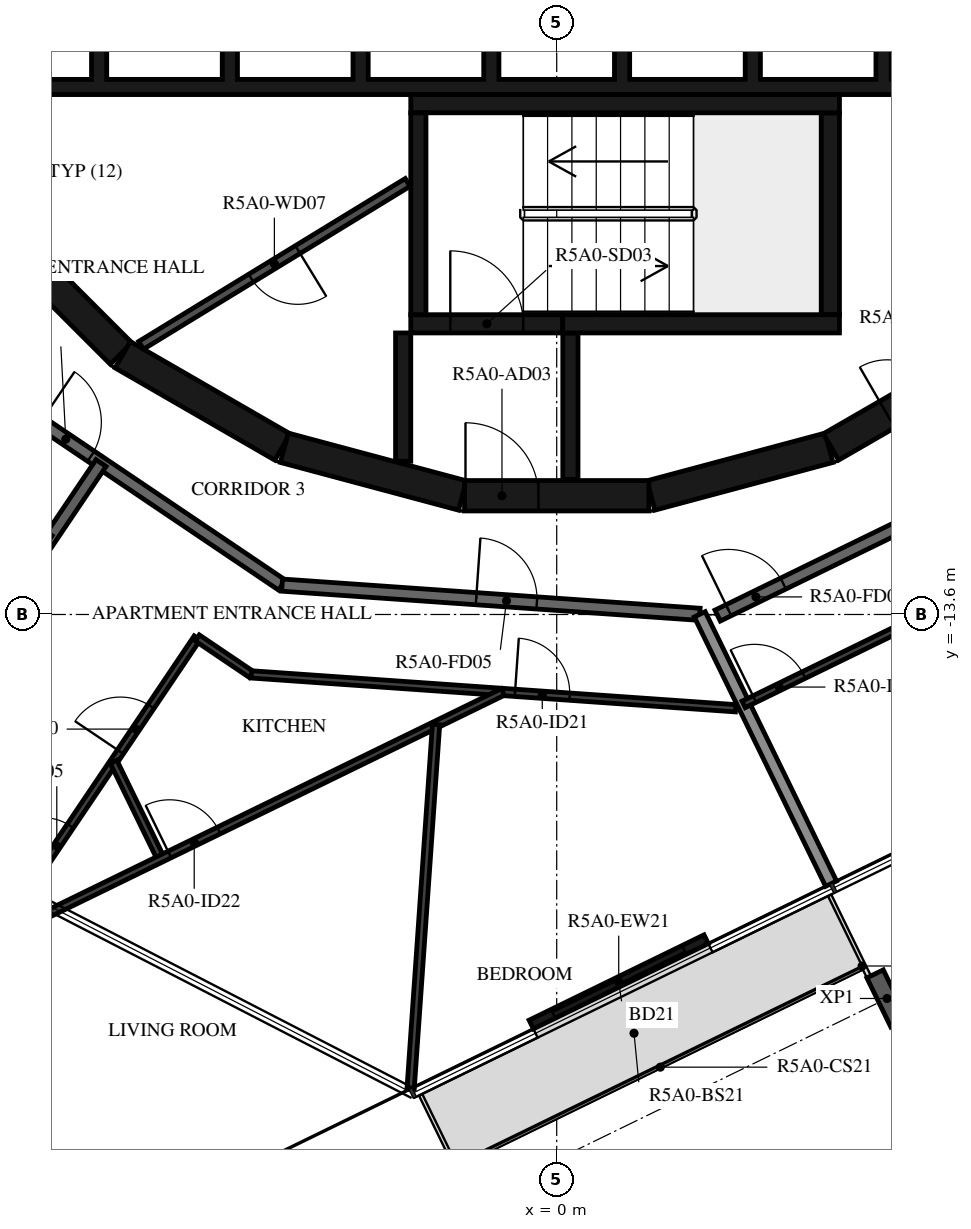
"""IFC4 building model, lengths in metres.
Left out: names, types, materials, properties, quantities, classifications, styles, units other than length and angle.
Written with IfcOpenShell. Run it as: python <this file> out.ifc"""

import sys

from ifc_helpers import new_model, si_unit, direction, frame, frame_2d, origin, origin_2d, place, context, subcontext, project, spatial, polyline, rectangle, i_section, outline, extrude, element, fill, save


model = new_model("IFC4")
c1 = context("Model", 3, precision=1e-05, world=origin(), true_north=direction((0.0, 1.0)))
c2 = subcontext(c1, "Body", "Model", "MODEL_VIEW")
j1 = project(units=[si_unit("LENGTHUNIT", "METRE"), si_unit("PLANEANGLEUNIT", "RADIAN")], contexts=[c1])
p1 = place(None, origin())
s1 = spatial("IfcSite", under=j1, at=p1, CompositionType="ELEMENT")
p2 = place(p1, origin())
s2 = spatial("IfcBuilding", under=s1, at=p2, CompositionType="ELEMENT")
p3 = place(p2, frame((0.0, 0.0, 195.4)))
s3 = spatial("IfcBuildingStorey", under=s2, at=p3, CompositionType="ELEMENT", Elevation=195.4)
p4 = place(p3, frame((5.433, -19.915, -0.38), z_axis=(0.0, 0.0, 1.0), x_axis=(-0.898794095235, -0.438371046456, 0.0)))
e1 = element("IfcColumn", 1, at=p4, inside=s3, PredefinedType="COLUMN", context=c2, shape_type="SweptSolid", body=[
    extrude(i_section(OverallWidth=0.3, OverallDepth=0.9, WebThickness=0.019, FlangeThickness=0.035, FilletRadius=0.03, at=origin_2d()), origin(), (0.0, 0.0, 1.0), 3.5),
])
p5 = place(p3, frame((-0.418, -20.343, 0.0), z_axis=(0.0, 0.0, 1.0), x_axis=(0.898778711213, 0.43840258698, 0.0)))
e2 = element("IfcWall", 2, at=p5, inside=s3, PredefinedType="STANDARD", context=c2, shape_type="SweptSolid", body=[
    extrude(rectangle(XDim=3.2, YDim=0.16, at=frame_2d((1.6, 0.0))), origin(), (0.0, 0.0, 1.0), 3.12),
])
p6 = place(p5, frame((0.4, 0.0, 0.0)))
e3 = element("IfcOpeningElement", 3, at=p6, cuts=e2, PredefinedType="OPENING", context=c2, shape_type="SweptSolid", body=[
    extrude(rectangle(XDim=2.4, YDim=2.4, at=frame_2d((1.2, 1.2))), frame((0.0, 0.09, 0.0), z_axis=(0.0, -1.0, 0.0), x_axis=(1.0, 0.0, 0.0)), (0.0, 0.0, 1.0), 0.18),
])
p7 = place(p3, frame((1.55, -11.643, 0.0), z_axis=(0.0, 0.0, 1.0), x_axis=(0.965948410781, 0.258734743916, 0.0)))
e4 = element("IfcWall", 4, at=p7, inside=s3, PredefinedType="SHEAR", context=c2, shape_type="SweptSolid", body=[
    extrude(rectangle(XDim=3.033, YDim=0.5, at=frame_2d((1.516, 0.0))), origin(), (0.0, 0.0, 1.0), 3.12),
])
p8 = place(p3, frame((4.51, -10.845, 0.0), z_axis=(0.0, 0.0, 1.0), x_axis=(0.865975092491, 0.500087131594, 0.0)))
e5 = element("IfcWall", 5, at=p8, inside=s3, PredefinedType="SHEAR", context=c2, shape_type="SweptSolid", body=[
    extrude(rectangle(XDim=3.033, YDim=0.5, at=frame_2d((1.516, 0.0))), origin(), (0.0, 0.0, 1.0), 3.12),
])
p9 = place(p8, frame((1.066, 0.0, 0.0)))
e6 = element("IfcOpeningElement", 6, at=p9, cuts=e5, PredefinedType="OPENING", context=c2, shape_type="SweptSolid", body=[
    extrude(rectangle(XDim=0.9, YDim=2.1, at=frame_2d((0.45, 1.05))), frame((0.0, 0.26, 0.0), z_axis=(0.0, -1.0, 0.0), x_axis=(1.0, 0.0, 0.0)), (0.0, 0.0, 1.0), 0.52),
])
p10 = place(p3, frame((-9.308, -7.164, 0.0), z_axis=(0.0, 0.0, 1.0), x_axis=(0.707106781187, -0.707106781187, 0.0)))
e7 = element("IfcWall", 7, at=p10, inside=s3, PredefinedType="SHEAR", context=c2, shape_type="SweptSolid", body=[
    extrude(rectangle(XDim=3.032, YDim=0.5, at=frame_2d((1.516, 0.0))), origin(), (0.0, 0.0, 1.0), 3.12),
])
for number, where, z_axis, x_axis in (
    (8, (-7.137, -9.329, 0.0), (0.0, 0.0, 1.0), (0.866, -0.5, 0.0)),
    (9, (-4.479, -10.858, 0.0), (0.0, 0.0, 1.0), (0.966, -0.259, 0.0)),
):
    element("IfcWall", number, at=place(p3, frame(where, z_axis=z_axis, x_axis=x_axis)), inside=s3, PredefinedType="SHEAR", context=c2, shape_type="SweptSolid", body=[
        extrude(rectangle(XDim=3.033, YDim=0.5, at=frame_2d((1.516, 0.0))), origin(), (0.0, 0.0, 1.0), 3.12),
    ])
p11 = place(p3, frame((-1.516, -11.647, 0.0), z_axis=(0.0, 0.0, 1.0), x_axis=(1.0, 0.0, 0.0)))
e10 = element("IfcWall", 10, at=p11, inside=s3, PredefinedType="SHEAR", context=c2, shape_type="SweptSolid", body=[
    extrude(rectangle(XDim=3.033, YDim=0.5, at=frame_2d((1.516, 0.0))), origin(), (0.0, 0.0, 1.0), 3.12),
])
p12 = place(p11, frame((0.016, 0.0, 0.0)))
e11 = element("IfcOpeningElement", 11, at=p12, cuts=e10, PredefinedType="OPENING", context=c2, shape_type="SweptSolid", body=[
    extrude(rectangle(XDim=1.2, YDim=2.1, at=frame_2d((0.6, 1.05))), frame((0.0, 0.26, 0.0), z_axis=(0.0, -1.0, 0.0), x_axis=(1.0, 0.0, 0.0)), (0.0, 0.0, 1.0), 0.52),
])
p13 = place(p3, frame((-2.275, -8.67, 0.0), z_axis=(0.0, 0.0, 1.0), x_axis=(0.0, 1.0, 0.0)))
e12 = element("IfcWall", 12, at=p13, inside=s3, PredefinedType="SHEAR", context=c2, shape_type="SweptSolid", body=[
    extrude(rectangle(XDim=3.32, YDim=0.25, at=frame_2d((1.66, 0.0))), origin(), (0.0, 0.0, 1.0), 3.12),
])
p14 = place(p3, frame((-2.4, -5.2, 0.0), z_axis=(0.0, 0.0, 1.0), x_axis=(1.0, 0.0, 0.0)))
e13 = element("IfcWall", 13, at=p14, inside=s3, PredefinedType="SHEAR", context=c2, shape_type="SweptSolid", body=[
    extrude(rectangle(XDim=7.05, YDim=0.3, at=frame_2d((3.525, 0.0))), origin(), (0.0, 0.0, 1.0), 3.12),
])
p15 = place(p3, frame((4.5, -8.67, 0.0), z_axis=(0.0, 0.0, 1.0), x_axis=(0.0, 1.0, 0.0)))
e14 = element("IfcWall", 14, at=p15, inside=s3, PredefinedType="SHEAR", context=c2, shape_type="SweptSolid", body=[
    extrude(rectangle(XDim=3.32, YDim=0.3, at=frame_2d((1.66, 0.0))), origin(), (0.0, 0.0, 1.0), 3.12),
])
p16 = place(p3, frame((0.1, -8.82, 0.0), z_axis=(0.0, 0.0, 1.0), x_axis=(1.0, 0.0, 0.0)))
e15 = element("IfcWall", 15, at=p16, inside=s3, PredefinedType="SHEAR", context=c2, shape_type="SweptSolid", body=[
    extrude(rectangle(XDim=4.55, YDim=0.3, at=frame_2d((2.275, 0.0))), origin(), (0.0, 0.0, 1.0), 3.12),
])
p17 = place(p3, frame((-2.4, -8.82, 0.0), z_axis=(0.0, 0.0, 1.0), x_axis=(1.0, 0.0, 0.0)))
e16 = element("IfcWall", 16, at=p17, inside=s3, PredefinedType="SHEAR", context=c2, shape_type="SweptSolid", body=[
    extrude(rectangle(XDim=2.5, YDim=0.3, at=frame_2d((1.25, 0.0))), origin(), (0.0, 0.0, 1.0), 3.12),
])
p18 = place(p17, frame((0.65, 0.0, 0.0)))
e17 = element("IfcOpeningElement", 17, at=p18, cuts=e16, PredefinedType="OPENING", context=c2, shape_type="SweptSolid", body=[
    extrude(rectangle(XDim=1.2, YDim=2.1, at=frame_2d((0.6, 1.05))), frame((0.0, 0.16, 0.0), z_axis=(0.0, -1.0, 0.0), x_axis=(1.0, 0.0, 0.0)), (0.0, 0.0, 1.0), 0.32),
])
p19 = place(p3, frame((-2.525, -8.97, 0.0), z_axis=(0.0, 0.0, 1.0), x_axis=(0.0, -1.0, 0.0)))
e18 = element("IfcWall", 18, at=p19, inside=s3, PredefinedType="SHEAR", context=c2, shape_type="SweptSolid", body=[
    extrude(rectangle(XDim=2.11, YDim=0.25, at=frame_2d((1.055, 0.0))), origin(), (0.0, 0.0, 1.0), 3.12),
])
p20 = place(p3, frame((0.225, -8.97, 0.0), z_axis=(0.0, 0.0, 1.0), x_axis=(0.0, -1.0, 0.0)))
e19 = element("IfcWall", 19, at=p20, inside=s3, PredefinedType="SHEAR", context=c2, shape_type="SweptSolid", body=[
    extrude(rectangle(XDim=2.41, YDim=0.25, at=frame_2d((1.205, 0.0))), origin(), (0.0, 0.0, 1.0), 3.12),
])
p21 = place(p3, origin())
e20 = element("IfcWall", 20, at=p21, inside=s3, PredefinedType="SHEAR", context=c2, shape_type="SweptSolid", body=[
    extrude(outline(polyline([(9.8, -5.05), (9.8, -4.8), (9.8, -1.9), (9.55, -1.9), (9.55, -4.8), (7.65, -4.8), (7.65, -1.9), (7.4, -1.9), (7.4, -4.8), (5.5, -4.8), (5.5, -1.9), (5.25, -1.9), (5.25, -4.8), (3.35, -4.8), (3.35, -1.9), (3.1, -1.9), (3.1, -4.8), (1.2, -4.8), (1.2, -1.9), (0.95, -1.9), (0.95, -4.8), (-0.95, -4.8), (-0.95, -1.9), (-1.2, -1.9), (-1.2, -4.8), (-3.1, -4.8), (-3.1, -1.9), (-3.35, -1.9), (-3.35, -4.8), (-5.25, -4.8), (-5.25, -1.9), (-5.5, -1.9), (-5.5, -4.8), (-7.4, -4.8), (-7.4, -1.9), (-7.65, -1.9), (-7.65, -4.8), (-9.55, -4.8), (-9.55, -1.9), (-9.8, -1.9), (-9.8, -4.8), (-9.8, -5.05), (9.8, -5.05)])), origin(), (0.0, 0.0, 1.0), 3.12),
])
p22 = place(p3, frame((-2.451, -6.495, 0.0), z_axis=(0.0, 0.0, 1.0), x_axis=(-0.853250115418, -0.521501908471, 0.0)))
e21 = element("IfcWall", 21, at=p22, inside=s3, PredefinedType="PARTITIONING", context=c2, shape_type="SweptSolid", body=[
    extrude(rectangle(XDim=5.137, YDim=0.15, at=frame_2d((2.569, 0.0))), origin(), (0.0, 0.0, 1.0), 3.12),
])
p23 = place(p22, frame((2.119, 0.0, 0.0)))
e22 = element("IfcOpeningElement", 22, at=p23, cuts=e21, PredefinedType="OPENING", context=c2, shape_type="SweptSolid", body=[
    extrude(rectangle(XDim=0.9, YDim=2.1, at=frame_2d((0.45, 1.05))), frame((0.0, 0.085, 0.0), z_axis=(0.0, -1.0, 0.0), x_axis=(1.0, 0.0, 0.0)), (0.0, 0.0, 1.0), 0.17),
])
p24 = place(p3, frame((-10.47, -9.101, 0.0), z_axis=(0.0, 0.0, 1.0), x_axis=(0.829035841718, -0.559195469534, 0.0)))
e23 = element("IfcWall", 23, at=p24, inside=s3, PredefinedType="STANDARD", context=c2, shape_type="SweptSolid", body=[
    extrude(rectangle(XDim=7.181, YDim=0.2, at=frame_2d((3.591, 0.0))), origin(), (0.0, 0.0, 1.0), 3.12),
])
p25 = place(p24, frame((2.39, 0.0, 0.0)))
e24 = element("IfcOpeningElement", 24, at=p25, cuts=e23, PredefinedType="OPENING", context=c2, shape_type="SweptSolid", body=[
    extrude(rectangle(XDim=1.0, YDim=2.1, at=frame_2d((0.5, 1.05))), frame((0.0, 0.11, 0.0), z_axis=(0.0, -1.0, 0.0), x_axis=(1.0, 0.0, 0.0)), (0.0, 0.0, 1.0), 0.22),
])
p26 = place(p3, frame((-4.517, -13.117, 0.0), z_axis=(0.0, 0.0, 1.0), x_axis=(0.997564669554, -0.069747616856, 0.0)))
e25 = element("IfcWall", 25, at=p26, inside=s3, PredefinedType="STANDARD", context=c2, shape_type="SweptSolid", body=[
    extrude(rectangle(XDim=6.885, YDim=0.2, at=frame_2d((3.443, 0.0))), origin(), (0.0, 0.0, 1.0), 3.12),
])
p27 = place(p26, frame((3.2, 0.0, 0.0)))
e26 = element("IfcOpeningElement", 26, at=p27, cuts=e25, PredefinedType="OPENING", context=c2, shape_type="SweptSolid", body=[
    extrude(rectangle(XDim=1.0, YDim=2.1, at=frame_2d((0.5, 1.05))), frame((0.0, 0.11, 0.0), z_axis=(0.0, -1.0, 0.0), x_axis=(1.0, 0.0, 0.0)), (0.0, 0.0, 1.0), 0.22),
])
p28 = place(p3, frame((2.647, -13.618, 0.0), z_axis=(0.0, 0.0, 1.0), x_axis=(0.898796543751, 0.438366026218, 0.0)))
e27 = element("IfcWall", 27, at=p28, inside=s3, PredefinedType="STANDARD", context=c2, shape_type="SweptSolid", body=[
    extrude(rectangle(XDim=7.181, YDim=0.2, at=frame_2d((3.591, 0.0))), origin(), (0.0, 0.0, 1.0), 3.12),
])
p29 = place(p28, frame((0.2, 0.0, 0.0)))
e28 = element("IfcOpeningElement", 28, at=p29, cuts=e27, PredefinedType="OPENING", context=c2, shape_type="SweptSolid", body=[
    extrude(rectangle(XDim=1.0, YDim=2.1, at=frame_2d((0.5, 1.05))), frame((0.0, 0.11, 0.0), z_axis=(0.0, -1.0, 0.0), x_axis=(1.0, 0.0, 0.0)), (0.0, 0.0, 1.0), 0.22),
])
p30 = place(p3, frame((-10.407, -15.43, 0.0), z_axis=(0.0, 0.0, 1.0), x_axis=(0.559038328133, 0.829141813973, 0.0)))
e29 = element("IfcWall", 29, at=p30, inside=s3, PredefinedType="STANDARD", context=c2, shape_type="SweptSolid", body=[
    extrude(rectangle(XDim=5.212, YDim=0.2, at=frame_2d((2.606, 0.0))), origin(), (0.0, 0.0, 1.0), 3.12),
])
p31 = place(p3, frame((4.512, -18.027, 0.0), z_axis=(0.0, 0.0, 1.0), x_axis=(-0.438374835386, 0.898792247241, 0.0)))
e30 = element("IfcWall", 30, at=p31, inside=s3, PredefinedType="STANDARD", context=c2, shape_type="SweptSolid", body=[
    extrude(rectangle(XDim=4.929, YDim=0.2, at=frame_2d((2.464, 0.0))), origin(), (0.0, 0.0, 1.0), 2.73),
])
p32 = place(p3, frame((-8.557, -17.906, 0.0), z_axis=(0.0, 0.0, 1.0), x_axis=(0.559194471553, 0.829036514868, 0.0)))
e31 = element("IfcWall", 31, at=p32, inside=s3, PredefinedType="PARTITIONING", context=c2, shape_type="SweptSolid", body=[
    extrude(rectangle(XDim=4.73, YDim=0.12, at=frame_2d((2.365, 0.0))), origin(), (0.0, 0.0, 1.0), 3.12),
])
p33 = place(p32, frame((0.2, 0.0, 0.0)))
e32 = element("IfcOpeningElement", 32, at=p33, cuts=e31, PredefinedType="OPENING", context=c2, shape_type="SweptSolid", body=[
    extrude(rectangle(XDim=0.8, YDim=2.1, at=frame_2d((0.4, 1.05))), frame((0.0, 0.07, 0.0), z_axis=(0.0, -1.0, 0.0), x_axis=(1.0, 0.0, 0.0)), (0.0, 0.0, 1.0), 0.14),
])
p34 = place(p32, frame((2.471, 0.0, 0.0)))
e33 = element("IfcOpeningElement", 33, at=p34, cuts=e31, PredefinedType="OPENING", context=c2, shape_type="SweptSolid", body=[
    extrude(rectangle(XDim=0.9, YDim=2.1, at=frame_2d((0.45, 1.05))), frame((0.0, 0.07, 0.0), z_axis=(0.0, -1.0, 0.0), x_axis=(1.0, 0.0, 0.0)), (0.0, 0.0, 1.0), 0.14),
])
p35 = place(p3, frame((-5.912, -13.985, 0.0), z_axis=(0.0, 0.0, 1.0), x_axis=(0.829027978444, -0.559207127062, 0.0)))
e34 = element("IfcWall", 34, at=p35, inside=s3, PredefinedType="PARTITIONING", context=c2, shape_type="SweptSolid", body=[
    extrude(rectangle(XDim=1.073, YDim=0.12, at=frame_2d((0.537, 0.0))), origin(), (0.0, 0.0, 1.0), 3.12),
])
p36 = place(p3, frame((-5.022, -14.585, 0.0), z_axis=(0.0, 0.0, 1.0), x_axis=(0.997565118395, -0.069741197017, 0.0)))
e35 = element("IfcWall", 35, at=p36, inside=s3, PredefinedType="PARTITIONING", context=c2, shape_type="SweptSolid", body=[
    extrude(rectangle(XDim=7.985, YDim=0.12, at=frame_2d((3.993, 0.0))), origin(), (0.0, 0.0, 1.0), 3.12),
])
p37 = place(p36, frame((4.346, 0.0, 0.0)))
e36 = element("IfcOpeningElement", 36, at=p37, cuts=e35, PredefinedType="OPENING", context=c2, shape_type="SweptSolid", body=[
    extrude(rectangle(XDim=0.9, YDim=2.1, at=frame_2d((0.45, 1.05))), frame((0.0, 0.07, 0.0), z_axis=(0.0, -1.0, 0.0), x_axis=(1.0, 0.0, 0.0)), (0.0, 0.0, 1.0), 0.14),
])
p38 = place(p3, frame((-6.51, -17.617, 0.0), z_axis=(0.0, 0.0, 1.0), x_axis=(-0.438380229518, 0.898789616299, 0.0)))
e37 = element("IfcWall", 37, at=p38, inside=s3, PredefinedType="PARTITIONING", context=c2, shape_type="SweptSolid", body=[
    extrude(rectangle(XDim=1.773, YDim=0.12, at=frame_2d((0.887, 0.0))), origin(), (0.0, 0.0, 1.0), 3.12),
])
p39 = place(p3, frame((-9.886, -19.264, 0.0), z_axis=(0.0, 0.0, 1.0), x_axis=(0.898796326112, 0.43836647245, 0.0)))
e38 = element("IfcWall", 38, at=p39, inside=s3, PredefinedType="PARTITIONING", context=c2, shape_type="SweptSolid", body=[
    extrude(rectangle(XDim=10.014, YDim=0.12, at=frame_2d((5.007, 0.0))), origin(), (0.0, 0.0, 1.0), 3.12),
])
p40 = place(p39, frame((3.917, 0.0, 0.0)))
e39 = element("IfcOpeningElement", 39, at=p40, cuts=e38, PredefinedType="OPENING", context=c2, shape_type="SweptSolid", body=[
    extrude(rectangle(XDim=0.9, YDim=2.1, at=frame_2d((0.45, 1.05))), frame((0.0, 0.07, 0.0), z_axis=(0.0, -1.0, 0.0), x_axis=(1.0, 0.0, 0.0)), (0.0, 0.0, 1.0), 0.14),
])
p41 = place(p3, frame((-2.403, -21.4, 0.0), z_axis=(0.0, 0.0, 1.0), x_axis=(0.069729998801, 0.997565901215, 0.0)))
e40 = element("IfcWall", 40, at=p41, inside=s3, PredefinedType="PARTITIONING", context=c2, shape_type="SweptSolid", body=[
    extrude(rectangle(XDim=6.005, YDim=0.12, at=frame_2d((3.002, 0.0))), origin(), (0.0, 0.0, 1.0), 3.12),
])
p42 = place(p3, frame((3.074, -15.078, 0.0), z_axis=(0.0, 0.0, 1.0), x_axis=(0.898800770739, 0.438357359377, 0.0)))
e41 = element("IfcWall", 41, at=p42, inside=s3, PredefinedType="PARTITIONING", context=c2, shape_type="SweptSolid", body=[
    extrude(rectangle(XDim=7.694, YDim=0.12, at=frame_2d((3.847, 0.0))), origin(), (0.0, 0.0, 1.0), 3.12),
])
p43 = place(p42, frame((0.2, 0.0, 0.0)))
e42 = element("IfcOpeningElement", 42, at=p43, cuts=e41, PredefinedType="OPENING", context=c2, shape_type="SweptSolid", body=[
    extrude(rectangle(XDim=0.9, YDim=2.1, at=frame_2d((0.45, 1.05))), frame((0.0, 0.07, 0.0), z_axis=(0.0, -1.0, 0.0), x_axis=(1.0, 0.0, 0.0)), (0.0, 0.0, 1.0), 0.14),
])
p44 = place(p6, origin())
e43 = element("IfcDoor", 43, at=p44, inside=s3, OperationType="DOUBLE_DOOR_SLIDING", PredefinedType="DOOR", context=c2, shape_type="SweptSolid", body=[
    extrude(rectangle(XDim=2.4, YDim=2.4, at=frame_2d((1.2, 1.2))), frame((0.0, 0.025, 0.0), z_axis=(0.0, -1.0, 0.0), x_axis=(1.0, 0.0, 0.0)), (0.0, 0.0, 1.0), 0.05),
])
fill(e3, e43)
p45 = place(p18, origin())
e44 = element("IfcDoor", 44, at=p45, inside=s3, OperationType="SINGLE_SWING_LEFT", PredefinedType="DOOR", context=c2, shape_type="SweptSolid", body=[
    extrude(rectangle(XDim=1.2, YDim=2.1, at=frame_2d((0.6, 1.05))), frame((0.0, 0.025, 0.0), z_axis=(0.0, -1.0, 0.0), x_axis=(1.0, 0.0, 0.0)), (0.0, 0.0, 1.0), 0.05),
])
fill(e17, e44)
p46 = place(p12, origin())
e45 = element("IfcDoor", 45, at=p46, inside=s3, OperationType="SINGLE_SWING_RIGHT", PredefinedType="DOOR", context=c2, shape_type="SweptSolid", body=[
    extrude(rectangle(XDim=1.2, YDim=2.1, at=frame_2d((0.6, 1.05))), frame((0.0, 0.025, 0.0), z_axis=(0.0, -1.0, 0.0), x_axis=(1.0, 0.0, 0.0)), (0.0, 0.0, 1.0), 0.05),
])
fill(e11, e45)
p47 = place(p23, origin())
e46 = element("IfcDoor", 46, at=p47, inside=s3, OperationType="SINGLE_SWING_LEFT", PredefinedType="DOOR", context=c2, shape_type="SweptSolid", body=[
    extrude(rectangle(XDim=0.9, YDim=2.1, at=frame_2d((0.45, 1.05))), frame((0.0, 0.025, 0.0), z_axis=(0.0, -1.0, 0.0), x_axis=(1.0, 0.0, 0.0)), (0.0, 0.0, 1.0), 0.05),
])
fill(e22, e46)
p48 = place(p9, origin())
e47 = element("IfcDoor", 47, at=p48, inside=s3, OperationType="SINGLE_SWING_RIGHT", PredefinedType="DOOR", context=c2, shape_type="SweptSolid", body=[
    extrude(rectangle(XDim=0.9, YDim=2.1, at=frame_2d((0.45, 1.05))), frame((0.0, 0.025, 0.0), z_axis=(0.0, -1.0, 0.0), x_axis=(1.0, 0.0, 0.0)), (0.0, 0.0, 1.0), 0.05),
])
fill(e6, e47)
p49 = place(p25, origin())
e48 = element("IfcDoor", 48, at=p49, inside=s3, OperationType="SINGLE_SWING_RIGHT", PredefinedType="DOOR", context=c2, shape_type="SweptSolid", body=[
    extrude(rectangle(XDim=1.0, YDim=2.1, at=frame_2d((0.5, 1.05))), frame((0.0, 0.025, 0.0), z_axis=(0.0, -1.0, 0.0), x_axis=(1.0, 0.0, 0.0)), (0.0, 0.0, 1.0), 0.05),
])
fill(e24, e48)
p50 = place(p27, origin())
e49 = element("IfcDoor", 49, at=p50, inside=s3, OperationType="SINGLE_SWING_LEFT", PredefinedType="DOOR", context=c2, shape_type="SweptSolid", body=[
    extrude(rectangle(XDim=1.0, YDim=2.1, at=frame_2d((0.5, 1.05))), frame((0.0, 0.025, 0.0), z_axis=(0.0, -1.0, 0.0), x_axis=(1.0, 0.0, 0.0)), (0.0, 0.0, 1.0), 0.05),
])
fill(e26, e49)
p51 = place(p33, origin())
e50 = element("IfcDoor", 50, at=p51, inside=s3, OperationType="SINGLE_SWING_LEFT", PredefinedType="DOOR", context=c2, shape_type="SweptSolid", body=[
    extrude(rectangle(XDim=0.8, YDim=2.1, at=frame_2d((0.4, 1.05))), frame((0.0, 0.025, 0.0), z_axis=(0.0, -1.0, 0.0), x_axis=(1.0, 0.0, 0.0)), (0.0, 0.0, 1.0), 0.05),
])
fill(e32, e50)
p52 = place(p34, origin())
e51 = element("IfcDoor", 51, at=p52, inside=s3, OperationType="SINGLE_SWING_LEFT", PredefinedType="DOOR", context=c2, shape_type="SweptSolid", body=[
    extrude(rectangle(XDim=0.9, YDim=2.1, at=frame_2d((0.45, 1.05))), frame((0.0, 0.025, 0.0), z_axis=(0.0, -1.0, 0.0), x_axis=(1.0, 0.0, 0.0)), (0.0, 0.0, 1.0), 0.05),
])
fill(e33, e51)
p53 = place(p37, origin())
e52 = element("IfcDoor", 52, at=p53, inside=s3, OperationType="SINGLE_SWING_LEFT", PredefinedType="DOOR", context=c2, shape_type="SweptSolid", body=[
    extrude(rectangle(XDim=0.9, YDim=2.1, at=frame_2d((0.45, 1.05))), frame((0.0, 0.025, 0.0), z_axis=(0.0, -1.0, 0.0), x_axis=(1.0, 0.0, 0.0)), (0.0, 0.0, 1.0), 0.05),
])
fill(e36, e52)
p54 = place(p40, origin())
e53 = element("IfcDoor", 53, at=p54, inside=s3, OperationType="SINGLE_SWING_LEFT", PredefinedType="DOOR", context=c2, shape_type="SweptSolid", body=[
    extrude(rectangle(XDim=0.9, YDim=2.1, at=frame_2d((0.45, 1.05))), frame((0.0, 0.025, 0.0), z_axis=(0.0, -1.0, 0.0), x_axis=(1.0, 0.0, 0.0)), (0.0, 0.0, 1.0), 0.05),
])
fill(e39, e53)
p55 = place(p29, origin())
e54 = element("IfcDoor", 54, at=p55, inside=s3, OperationType="SINGLE_SWING_LEFT", PredefinedType="DOOR", context=c2, shape_type="SweptSolid", body=[
    extrude(rectangle(XDim=1.0, YDim=2.1, at=frame_2d((0.5, 1.05))), frame((0.0, 0.025, 0.0), z_axis=(0.0, -1.0, 0.0), x_axis=(1.0, 0.0, 0.0)), (0.0, 0.0, 1.0), 0.05),
])
fill(e28, e54)
p56 = place(p43, origin())
e55 = element("IfcDoor", 55, at=p56, inside=s3, OperationType="SINGLE_SWING_LEFT", PredefinedType="DOOR", context=c2, shape_type="SweptSolid", body=[
    extrude(rectangle(XDim=0.9, YDim=2.1, at=frame_2d((0.45, 1.05))), frame((0.0, 0.025, 0.0), z_axis=(0.0, -1.0, 0.0), x_axis=(1.0, 0.0, 0.0)), (0.0, 0.0, 1.0), 0.05),
])
fill(e42, e55)
save(model, sys.argv[1])
